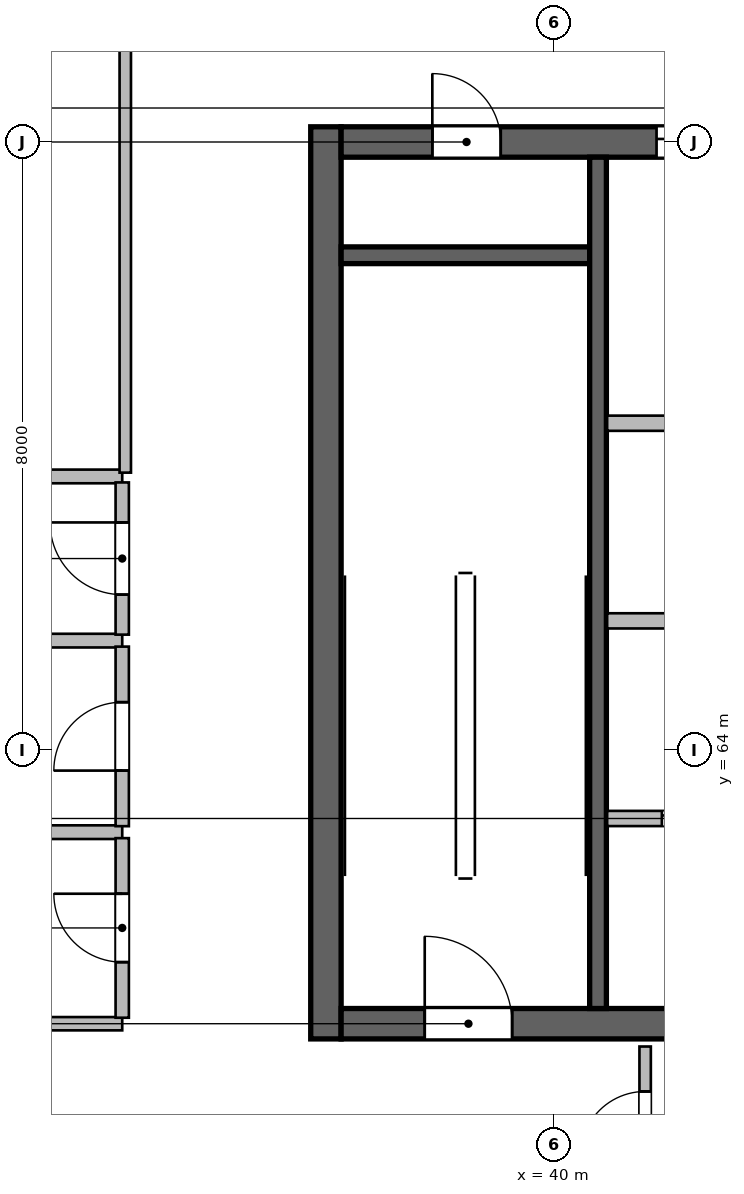
"""IFC4 building model, lengths in metres.
Left out: names, types, materials, properties, quantities, classifications, styles, units other than length and angle.
Written with IfcOpenShell. Run it as: python <this file> out.ifc"""

import sys

from ifc_helpers import new_model, si_unit, direction, frame, frame_2d, origin, place, context, subcontext, project, spatial, rectangle, extrude, source, transform, mapped, element, fill, save


model = new_model("IFC4")
c1 = context("Model", 3, precision=1e-05, world=origin(), true_north=direction((0.0, 1.0)))
c2 = subcontext(c1, "Body", "Model", "MODEL_VIEW")
j1 = project(units=[si_unit("LENGTHUNIT", "METRE"), si_unit("PLANEANGLEUNIT", "RADIAN")], contexts=[c1])
p1 = place(None, origin())
s1 = spatial("IfcSite", under=j1, at=p1, CompositionType="ELEMENT")
p2 = place(p1, origin())
s2 = spatial("IfcBuilding", under=s1, at=p2, CompositionType="ELEMENT")
p3 = place(p2, frame((0.0, 0.0, 312.6)))
s3 = spatial("IfcBuildingStorey", under=s2, at=p3, CompositionType="ELEMENT", Elevation=312.6)
m1 = source(origin(), c2, "Body", "SweptSolid", [
    extrude(rectangle(XDim=12.0, YDim=0.4, at=frame_2d((6.0, 0.0))), origin(), (0.0, 0.0, 1.0), 5.4),
])
p4 = place(p3, frame((37.0, 60.2, 0.0), z_axis=(0.0, 0.0, 1.0), x_axis=(0.0, 1.0, 0.0)))
e1 = element("IfcWall", 1, at=p4, inside=s3, PredefinedType="SHEAR", context=c2, shape_type="MappedRepresentation", body=[
    mapped(m1, transform((0.0, 0.0, 0.0), scale=1.0)),
])
m2 = source(origin(), c2, "Body", "SweptSolid", [
    extrude(rectangle(XDim=21.6, YDim=0.4, at=frame_2d((10.8, 0.0))), origin(), (0.0, 0.0, 1.0), 5.4),
])
p5 = place(p3, frame((37.2, 60.4, 0.0), z_axis=(0.0, 0.0, 1.0), x_axis=(1.0, 0.0, 0.0)))
e2 = element("IfcWall", 2, at=p5, inside=s3, PredefinedType="SHEAR", context=c2, shape_type="MappedRepresentation", body=[
    mapped(m2, transform((0.0, 0.0, 0.0), scale=1.0)),
])
p6 = place(p5, frame((1.1, 0.0, 0.0)))
e3 = element("IfcOpeningElement", 3, at=p6, cuts=e2, PredefinedType="OPENING", context=c2, shape_type="SweptSolid", body=[
    extrude(rectangle(XDim=1.15, YDim=2.15, at=frame_2d((0.575, 1.075))), frame((0.0, 0.21, 0.0), z_axis=(0.0, -1.0, 0.0), x_axis=(1.0, 0.0, 0.0)), (0.0, 0.0, 1.0), 0.42),
])
p7 = place(p5, frame((19.5, 0.0, 0.0)))
e4 = element("IfcOpeningElement", 4, at=p7, cuts=e2, PredefinedType="OPENING", context=c2, shape_type="SweptSolid", body=[
    extrude(rectangle(XDim=0.9, YDim=2.1, at=frame_2d((0.45, 1.05))), frame((0.0, 0.21, 0.0), z_axis=(0.0, -1.0, 0.0), x_axis=(1.0, 0.0, 0.0)), (0.0, 0.0, 1.0), 0.42),
])
p8 = place(p5, frame((12.02, 0.0, 0.0)))
e5 = element("IfcOpeningElement", 5, at=p8, cuts=e2, PredefinedType="OPENING", context=c2, shape_type="SweptSolid", body=[
    extrude(rectangle(XDim=1.6, YDim=2.15, at=frame_2d((0.8, 1.075))), frame((0.0, 0.21, 0.0), z_axis=(0.0, -1.0, 0.0), x_axis=(1.0, 0.0, 0.0)), (0.0, 0.0, 1.0), 0.42),
])
p9 = place(p3, frame((37.2, 72.0, 0.0), z_axis=(0.0, 0.0, 1.0), x_axis=(1.0, 0.0, 0.0)))
e6 = element("IfcWall", 6, at=p9, inside=s3, PredefinedType="SHEAR", context=c2, shape_type="MappedRepresentation", body=[
    mapped(m2, transform((0.0, 0.0, 0.0), scale=1.0)),
])
p10 = place(p9, frame((1.2, 0.0, 0.0)))
e7 = element("IfcOpeningElement", 7, at=p10, cuts=e6, PredefinedType="OPENING", context=c2, shape_type="SweptSolid", body=[
    extrude(rectangle(XDim=0.9, YDim=2.1, at=frame_2d((0.45, 1.05))), frame((0.0, 0.21, 0.0), z_axis=(0.0, -1.0, 0.0), x_axis=(1.0, 0.0, 0.0)), (0.0, 0.0, 1.0), 0.42),
])
p11 = place(p9, frame((14.7, 0.0, 0.0)))
e8 = element("IfcOpeningElement", 8, at=p11, cuts=e6, PredefinedType="OPENING", context=c2, shape_type="SweptSolid", body=[
    extrude(rectangle(XDim=1.2, YDim=2.15, at=frame_2d((0.6, 1.075))), frame((0.0, 0.21, 0.0), z_axis=(0.0, -1.0, 0.0), x_axis=(1.0, 0.0, 0.0)), (0.0, 0.0, 1.0), 0.42),
])
p12 = place(p9, frame((4.15, 0.0, 0.0)))
e9 = element("IfcOpeningElement", 9, at=p12, cuts=e6, PredefinedType="OPENING", context=c2, shape_type="SweptSolid", body=[
    extrude(rectangle(XDim=1.3, YDim=2.15, at=frame_2d((0.65, 1.075))), frame((0.0, 0.21, 0.0), z_axis=(0.0, -1.0, 0.0), x_axis=(1.0, 0.0, 0.0)), (0.0, 0.0, 1.0), 0.42),
])
p13 = place(p9, frame((7.25, 0.0, 0.0)))
e10 = element("IfcOpeningElement", 10, at=p13, cuts=e6, PredefinedType="OPENING", context=c2, shape_type="SweptSolid", body=[
    extrude(rectangle(XDim=0.9, YDim=2.1, at=frame_2d((0.45, 1.05))), frame((0.0, 0.21, 0.0), z_axis=(0.0, -1.0, 0.0), x_axis=(1.0, 0.0, 0.0)), (0.0, 0.0, 1.0), 0.42),
])
m3 = source(origin(), c2, "Body", "SweptSolid", [
    extrude(rectangle(XDim=3.27, YDim=0.22, at=frame_2d((1.635, 0.0))), origin(), (0.0, 0.0, 1.0), 5.4),
])
p14 = place(p3, frame((37.2, 70.51, 0.0), z_axis=(0.0, 0.0, 1.0), x_axis=(1.0, 0.0, 0.0)))
e11 = element("IfcWall", 11, at=p14, inside=s3, PredefinedType="SHEAR", context=c2, shape_type="MappedRepresentation", body=[
    mapped(m3, transform((0.0, 0.0, 0.0), scale=1.0)),
])
m4 = source(origin(), c2, "Body", "SweptSolid", [
    extrude(rectangle(XDim=11.2, YDim=0.22, at=frame_2d((5.6, 0.0))), origin(), (0.0, 0.0, 1.0), 5.4),
])
p15 = place(p3, frame((40.58, 60.6, 0.0), z_axis=(0.0, 0.0, 1.0), x_axis=(0.0, 1.0, 0.0)))
e12 = element("IfcWall", 12, at=p15, inside=s3, PredefinedType="SHEAR", context=c2, shape_type="MappedRepresentation", body=[
    mapped(m4, transform((0.0, 0.0, 0.0), scale=1.0)),
])
m5 = source(origin(), c2, "Body", "SweptSolid", [
    extrude(rectangle(XDim=8.8, YDim=0.2, at=frame_2d((4.4, 0.0))), origin(), (0.0, 0.0, 1.0), 5.12),
])
p16 = place(p3, frame((40.7, 68.3, 0.0), z_axis=(0.0, 0.0, 1.0), x_axis=(1.0, 0.0, 0.0)))
e13 = element("IfcWall", 13, at=p16, inside=s3, PredefinedType="SOLIDWALL", context=c2, shape_type="MappedRepresentation", body=[
    mapped(m5, transform((0.0, 0.0, 0.0), scale=1.0)),
])
m6 = source(origin(), c2, "Body", "SweptSolid", [
    extrude(rectangle(XDim=8.02, YDim=0.2, at=frame_2d((4.01, 0.0))), origin(), (0.0, 0.0, 1.0), 5.12),
])
p17 = place(p3, frame((40.7, 63.1, 0.0), z_axis=(0.0, 0.0, 1.0), x_axis=(1.0, 0.0, 0.0)))
e14 = element("IfcWall", 14, at=p17, inside=s3, PredefinedType="SOLIDWALL", context=c2, shape_type="MappedRepresentation", body=[
    mapped(m6, transform((0.0, 0.0, 0.0), scale=1.0)),
])
p18 = place(p17, frame((0.72, 0.0, 0.0)))
e15 = element("IfcOpeningElement", 15, at=p18, cuts=e14, PredefinedType="OPENING", context=c2, shape_type="SweptSolid", body=[
    extrude(rectangle(XDim=1.0, YDim=2.15, at=frame_2d((0.5, 1.075))), frame((0.0, 0.11, 0.0), z_axis=(0.0, -1.0, 0.0), x_axis=(1.0, 0.0, 0.0)), (0.0, 0.0, 1.0), 0.22),
])
p19 = place(p17, frame((2.62, 0.0, 0.0)))
e16 = element("IfcOpeningElement", 16, at=p19, cuts=e14, PredefinedType="OPENING", context=c2, shape_type="SweptSolid", body=[
    extrude(rectangle(XDim=1.0, YDim=2.15, at=frame_2d((0.5, 1.075))), frame((0.0, 0.11, 0.0), z_axis=(0.0, -1.0, 0.0), x_axis=(1.0, 0.0, 0.0)), (0.0, 0.0, 1.0), 0.22),
])
p20 = place(p17, frame((4.55, 0.0, 0.0)))
e17 = element("IfcOpeningElement", 17, at=p20, cuts=e14, PredefinedType="OPENING", context=c2, shape_type="SweptSolid", body=[
    extrude(rectangle(XDim=1.0, YDim=2.15, at=frame_2d((0.5, 1.075))), frame((0.0, 0.11, 0.0), z_axis=(0.0, -1.0, 0.0), x_axis=(1.0, 0.0, 0.0)), (0.0, 0.0, 1.0), 0.22),
])
p21 = place(p17, frame((6.55, 0.0, 0.0)))
e18 = element("IfcOpeningElement", 18, at=p21, cuts=e14, PredefinedType="OPENING", context=c2, shape_type="SweptSolid", body=[
    extrude(rectangle(XDim=1.0, YDim=2.15, at=frame_2d((0.5, 1.075))), frame((0.0, 0.11, 0.0), z_axis=(0.0, -1.0, 0.0), x_axis=(1.0, 0.0, 0.0)), (0.0, 0.0, 1.0), 0.22),
])
p22 = place(p3, frame((40.7, 65.7, 0.0), z_axis=(0.0, 0.0, 1.0), x_axis=(1.0, 0.0, 0.0)))
e19 = element("IfcWall", 19, at=p22, inside=s3, PredefinedType="SOLIDWALL", context=c2, shape_type="MappedRepresentation", body=[
    mapped(m5, transform((0.0, 0.0, 0.0), scale=1.0)),
])
p23 = place(p22, frame((1.6, 0.0, 0.0)))
e20 = element("IfcOpeningElement", 20, at=p23, cuts=e19, PredefinedType="OPENING", context=c2, shape_type="SweptSolid", body=[
    extrude(rectangle(XDim=0.9, YDim=2.1, at=frame_2d((0.45, 1.05))), frame((0.0, 0.11, 0.0), z_axis=(0.0, -1.0, 0.0), x_axis=(1.0, 0.0, 0.0)), (0.0, 0.0, 1.0), 0.22),
])
p24 = place(p22, frame((6.1, 0.0, 0.0)))
e21 = element("IfcOpeningElement", 21, at=p24, cuts=e19, PredefinedType="OPENING", context=c2, shape_type="SweptSolid", body=[
    extrude(rectangle(XDim=0.9, YDim=2.1, at=frame_2d((0.45, 1.05))), frame((0.0, 0.11, 0.0), z_axis=(0.0, -1.0, 0.0), x_axis=(1.0, 0.0, 0.0)), (0.0, 0.0, 1.0), 0.22),
])
m7 = source(origin(), c2, "Body", "SweptSolid", [
    extrude(rectangle(XDim=2.033, YDim=0.15, at=frame_2d((1.016, 0.0))), origin(), (0.0, 0.0, 1.0), 5.12),
])
p25 = place(p3, frame((41.2, 58.067, 0.0), z_axis=(0.0, 0.0, 1.0), x_axis=(0.0, 1.0, 0.0)))
e22 = element("IfcWall", 22, at=p25, inside=s3, PredefinedType="PARTITIONING", context=c2, shape_type="MappedRepresentation", body=[
    mapped(m7, transform((0.0, 0.0, 0.0), scale=1.0)),
])
p26 = place(p25, frame((0.591, 0.0, 0.0)))
e23 = element("IfcOpeningElement", 23, at=p26, cuts=e22, PredefinedType="OPENING", context=c2, shape_type="SweptSolid", body=[
    extrude(rectangle(XDim=0.85, YDim=2.1, at=frame_2d((0.425, 1.05))), frame((0.0, 0.085, 0.0), z_axis=(0.0, -1.0, 0.0), x_axis=(1.0, 0.0, 0.0)), (0.0, 0.0, 1.0), 0.17),
])
m8 = source(origin(), c2, "Body", "SweptSolid", [
    extrude(rectangle(XDim=3.52, YDim=0.175, at=frame_2d((1.76, 0.0))), origin(), (0.0, 0.0, 1.0), 5.12),
])
p27 = place(p3, frame((30.8, 60.4, 0.0), z_axis=(0.0, 0.0, 1.0), x_axis=(1.0, 0.0, 0.0)))
e24 = element("IfcWall", 24, at=p27, inside=s3, PredefinedType="PARTITIONING", context=c2, shape_type="MappedRepresentation", body=[
    mapped(m8, transform((0.0, 0.0, 0.0), scale=1.0)),
])
m9 = source(origin(), c2, "Body", "SweptSolid", [
    extrude(rectangle(XDim=3.52, YDim=0.18, at=frame_2d((1.76, 0.0))), origin(), (0.0, 0.0, 1.0), 5.12),
])
p28 = place(p3, frame((30.8, 62.92, 0.0), z_axis=(0.0, 0.0, 1.0), x_axis=(1.0, 0.0, 0.0)))
e25 = element("IfcWall", 25, at=p28, inside=s3, PredefinedType="PLUMBINGWALL", context=c2, shape_type="MappedRepresentation", body=[
    mapped(m9, transform((0.0, 0.0, 0.0), scale=1.0)),
])
m10 = source(origin(), c2, "Body", "SweptSolid", [
    extrude(rectangle(XDim=2.363, YDim=0.175, at=frame_2d((1.181, 0.0))), origin(), (0.0, 0.0, 1.0), 5.12),
])
p29 = place(p3, frame((34.32, 60.479, 0.0), z_axis=(0.0, 0.0, 1.0), x_axis=(0.0, 1.0, 0.0)))
e26 = element("IfcWall", 26, at=p29, inside=s3, PredefinedType="PARTITIONING", context=c2, shape_type="MappedRepresentation", body=[
    mapped(m10, transform((0.0, 0.0, 0.0), scale=1.0)),
])
p30 = place(p29, frame((0.731, 0.0, 0.0)))
e27 = element("IfcOpeningElement", 27, at=p30, cuts=e26, PredefinedType="OPENING", context=c2, shape_type="SweptSolid", body=[
    extrude(rectangle(XDim=0.9, YDim=2.08, at=frame_2d((0.45, 1.04))), frame((0.0, 0.098, 0.0), z_axis=(0.0, -1.0, 0.0), x_axis=(1.0, 0.0, 0.0)), (0.0, 0.0, 1.0), 0.195),
])
p31 = place(p3, frame((30.8, 65.44, 0.0), z_axis=(0.0, 0.0, 1.0), x_axis=(1.0, 0.0, 0.0)))
e28 = element("IfcWall", 28, at=p31, inside=s3, PredefinedType="PLUMBINGWALL", context=c2, shape_type="MappedRepresentation", body=[
    mapped(m9, transform((0.0, 0.0, 0.0), scale=1.0)),
])
m11 = source(origin(), c2, "Body", "SweptSolid", [
    extrude(rectangle(XDim=2.362, YDim=0.175, at=frame_2d((1.181, 0.0))), origin(), (0.0, 0.0, 1.0), 5.12),
])
p32 = place(p3, frame((34.32, 62.999, 0.0), z_axis=(0.0, 0.0, 1.0), x_axis=(0.0, 1.0, 0.0)))
e29 = element("IfcWall", 29, at=p32, inside=s3, PredefinedType="PARTITIONING", context=c2, shape_type="MappedRepresentation", body=[
    mapped(m11, transform((0.0, 0.0, 0.0), scale=1.0)),
])
p33 = place(p32, frame((0.731, 0.0, 0.0)))
e30 = element("IfcOpeningElement", 30, at=p33, cuts=e29, PredefinedType="OPENING", context=c2, shape_type="SweptSolid", body=[
    extrude(rectangle(XDim=0.9, YDim=2.08, at=frame_2d((0.45, 1.04))), frame((0.0, 0.098, 0.0), z_axis=(0.0, -1.0, 0.0), x_axis=(1.0, 0.0, 0.0)), (0.0, 0.0, 1.0), 0.195),
])
p34 = place(p3, frame((30.8, 67.6, 0.0), z_axis=(0.0, 0.0, 1.0), x_axis=(1.0, 0.0, 0.0)))
e31 = element("IfcWall", 31, at=p34, inside=s3, PredefinedType="PLUMBINGWALL", context=c2, shape_type="MappedRepresentation", body=[
    mapped(m9, transform((0.0, 0.0, 0.0), scale=1.0)),
])
m12 = source(origin(), c2, "Body", "SweptSolid", [
    extrude(rectangle(XDim=2.002, YDim=0.175, at=frame_2d((1.001, 0.0))), origin(), (0.0, 0.0, 1.0), 5.12),
])
p35 = place(p3, frame((34.32, 65.519, 0.0), z_axis=(0.0, 0.0, 1.0), x_axis=(0.0, 1.0, 0.0)))
e32 = element("IfcWall", 32, at=p35, inside=s3, PredefinedType="PARTITIONING", context=c2, shape_type="MappedRepresentation", body=[
    mapped(m12, transform((0.0, 0.0, 0.0), scale=1.0)),
])
p36 = place(p35, frame((0.526, 0.0, 0.0)))
e33 = element("IfcOpeningElement", 33, at=p36, cuts=e32, PredefinedType="OPENING", context=c2, shape_type="SweptSolid", body=[
    extrude(rectangle(XDim=0.95, YDim=2.12, at=frame_2d((0.475, 1.06))), frame((0.0, 0.098, 0.0), z_axis=(0.0, -1.0, 0.0), x_axis=(1.0, 0.0, 0.0)), (0.0, 0.0, 1.0), 0.195),
])
m13 = source(origin(), c2, "Body", "SweptSolid", [
    extrude(rectangle(XDim=6.862, YDim=0.15, at=frame_2d((3.431, 0.0))), origin(), (0.0, 0.0, 1.0), 5.12),
])
p37 = place(p3, frame((34.36, 67.65, 0.0), z_axis=(0.0, 0.0, 1.0), x_axis=(0.0, 1.0, 0.0)))
e34 = element("IfcWall", 34, at=p37, inside=s3, PredefinedType="PARTITIONING", context=c2, shape_type="MappedRepresentation", body=[
    mapped(m13, transform((0.0, 0.0, 0.0), scale=1.0)),
])
m14 = source(origin(), c2, "Body", "SweptSolid", [
    extrude(rectangle(XDim=1.15, YDim=2.15, at=frame_2d((0.575, 1.075))), frame((0.0, 0.025, 0.0), z_axis=(0.0, -1.0, 0.0), x_axis=(1.0, 0.0, 0.0)), (0.0, 0.0, 1.0), 0.05),
])
p38 = place(p6, origin())
e35 = element("IfcDoor", 35, at=p38, inside=s3, OperationType="SINGLE_SWING_LEFT", PredefinedType="DOOR", context=c2, shape_type="MappedRepresentation", body=[
    mapped(m14, transform((0.0, 0.0, 0.0), scale=1.0)),
])
fill(e3, e35)
m15 = source(origin(), c2, "Body", "SweptSolid", [
    extrude(rectangle(XDim=0.9, YDim=2.1, at=frame_2d((0.45, 1.05))), frame((0.0, 0.025, 0.0), z_axis=(0.0, -1.0, 0.0), x_axis=(1.0, 0.0, 0.0)), (0.0, 0.0, 1.0), 0.05),
])
p39 = place(p10, origin())
e36 = element("IfcDoor", 36, at=p39, inside=s3, OperationType="SINGLE_SWING_LEFT", PredefinedType="DOOR", context=c2, shape_type="MappedRepresentation", body=[
    mapped(m15, transform((0.0, 0.0, 0.0), scale=1.0)),
])
fill(e7, e36)
m16 = source(origin(), c2, "Body", "SweptSolid", [
    extrude(rectangle(XDim=1.3, YDim=2.15, at=frame_2d((0.65, 1.075))), frame((0.0, 0.025, 0.0), z_axis=(0.0, -1.0, 0.0), x_axis=(1.0, 0.0, 0.0)), (0.0, 0.0, 1.0), 0.05),
])
p40 = place(p12, origin())
e37 = element("IfcDoor", 37, at=p40, inside=s3, OperationType="DOUBLE_DOOR_SLIDING", PredefinedType="DOOR", context=c2, shape_type="MappedRepresentation", body=[
    mapped(m16, transform((0.0, 0.0, 0.0), scale=1.0)),
])
fill(e9, e37)
m17 = source(origin(), c2, "Body", "SweptSolid", [
    extrude(rectangle(XDim=1.0, YDim=2.15, at=frame_2d((0.5, 1.075))), frame((0.0, 0.025, 0.0), z_axis=(0.0, -1.0, 0.0), x_axis=(1.0, 0.0, 0.0)), (0.0, 0.0, 1.0), 0.05),
])
p41 = place(p18, origin())
e38 = element("IfcDoor", 38, at=p41, inside=s3, OperationType="DOUBLE_DOOR_SLIDING", PredefinedType="DOOR", context=c2, shape_type="MappedRepresentation", body=[
    mapped(m17, transform((0.0, 0.0, 0.0), scale=1.0)),
])
fill(e15, e38)
m18 = source(origin(), c2, "Body", "SweptSolid", [
    extrude(rectangle(XDim=0.85, YDim=2.1, at=frame_2d((0.425, 1.05))), frame((0.0, 0.025, 0.0), z_axis=(0.0, -1.0, 0.0), x_axis=(1.0, 0.0, 0.0)), (0.0, 0.0, 1.0), 0.05),
])
p42 = place(p26, origin())
e39 = element("IfcDoor", 39, at=p42, inside=s3, OperationType="SINGLE_SWING_LEFT", PredefinedType="DOOR", context=c2, shape_type="MappedRepresentation", body=[
    mapped(m18, transform((0.0, 0.0, 0.0), scale=1.0)),
])
fill(e23, e39)
m19 = source(origin(), c2, "Body", "SweptSolid", [
    extrude(rectangle(XDim=0.9, YDim=2.08, at=frame_2d((0.45, 1.04))), frame((0.0, 0.025, 0.0), z_axis=(0.0, -1.0, 0.0), x_axis=(1.0, 0.0, 0.0)), (0.0, 0.0, 1.0), 0.05),
])
p43 = place(p30, origin())
e40 = element("IfcDoor", 40, at=p43, inside=s3, OperationType="SINGLE_SWING_RIGHT", PredefinedType="DOOR", context=c2, shape_type="MappedRepresentation", body=[
    mapped(m19, transform((0.0, 0.0, 0.0), scale=1.0)),
])
fill(e27, e40)
p44 = place(p33, origin())
e41 = element("IfcDoor", 41, at=p44, inside=s3, OperationType="SINGLE_SWING_LEFT", PredefinedType="DOOR", context=c2, shape_type="MappedRepresentation", body=[
    mapped(m19, transform((0.0, 0.0, 0.0), scale=1.0)),
])
fill(e30, e41)
m20 = source(origin(), c2, "Body", "SweptSolid", [
    extrude(rectangle(XDim=0.95, YDim=2.12, at=frame_2d((0.475, 1.06))), frame((0.0, 0.025, 0.0), z_axis=(0.0, -1.0, 0.0), x_axis=(1.0, 0.0, 0.0)), (0.0, 0.0, 1.0), 0.05),
])
p45 = place(p36, origin())
e42 = element("IfcDoor", 42, at=p45, inside=s3, OperationType="SINGLE_SWING_RIGHT", PredefinedType="DOOR", context=c2, shape_type="MappedRepresentation", body=[
    mapped(m20, transform((0.0, 0.0, 0.0), scale=1.0)),
])
fill(e33, e42)
save(model, sys.argv[1])
